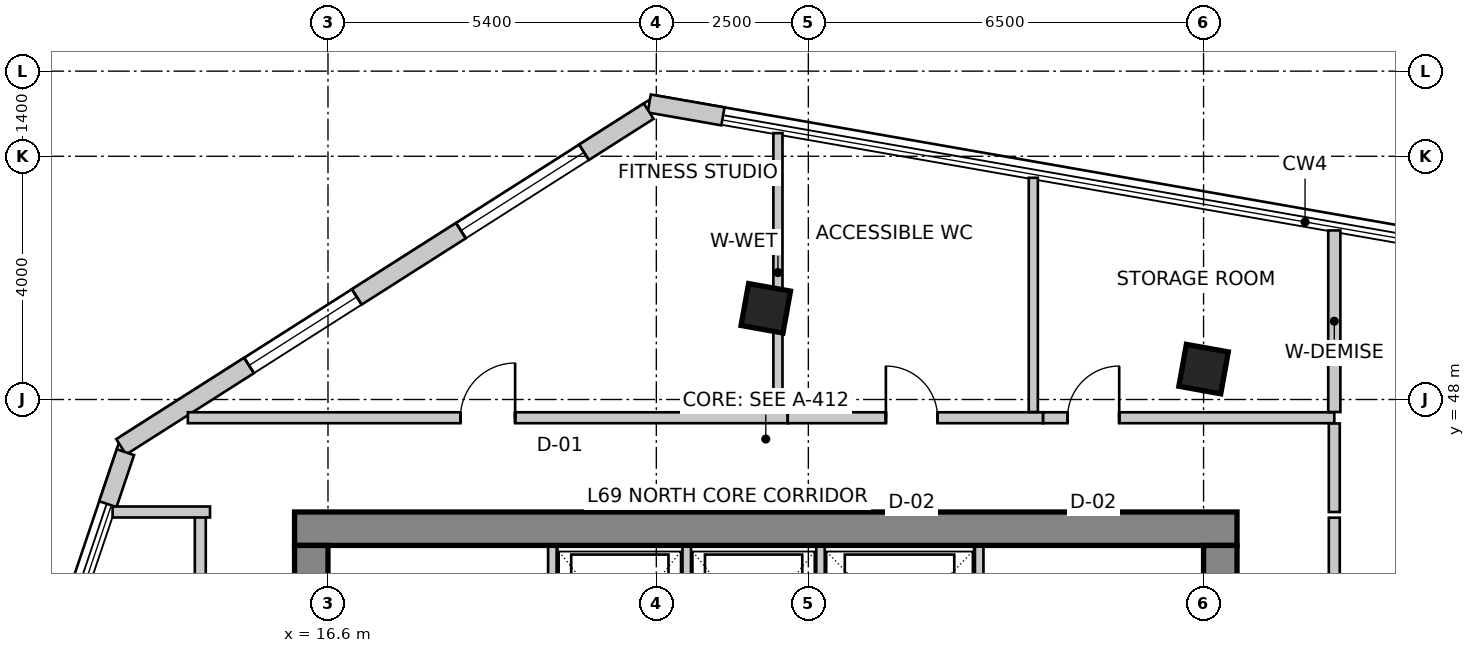
"""IFC4 building model, lengths in metres.
Left out: names, types, materials, properties, quantities, classifications, styles, units other than length and angle.
Written with IfcOpenShell. Run it as: python <this file> out.ifc"""

import sys

from ifc_helpers import new_model, si_unit, direction, frame, frame_2d, origin, origin_2d, place, context, subcontext, project, spatial, rectangle, extrude, source, transform, mapped, element, fill, save


model = new_model("IFC4")
c1 = context("Model", 3, precision=1e-05, world=origin(), true_north=direction((0.0, 1.0)))
c2 = subcontext(c1, "Body", "Model", "MODEL_VIEW")
j1 = project(units=[si_unit("LENGTHUNIT", "METRE"), si_unit("PLANEANGLEUNIT", "RADIAN")], contexts=[c1])
p1 = place(None, origin())
s1 = spatial("IfcSite", under=j1, at=p1, CompositionType="ELEMENT")
p2 = place(p1, origin())
s2 = spatial("IfcBuilding", under=s1, at=p2, CompositionType="ELEMENT")
p3 = place(p2, frame((0.0, 0.0, 270.9)))
s3 = spatial("IfcBuildingStorey", under=s2, at=p3, CompositionType="ELEMENT", Elevation=270.9)
p4 = place(p3, frame((16.05, 45.875, 0.0), z_axis=(0.0, 0.0, 1.0), x_axis=(1.0, 0.0, 0.0)))
e1 = element("IfcWall", 1, at=p4, inside=s3, PredefinedType="SHEAR", context=c2, shape_type="SweptSolid", body=[
    extrude(rectangle(XDim=15.5, YDim=0.55, at=frame_2d((7.75, 0.0))), origin(), (0.0, 0.0, 1.0), 3.6),
])
p5 = place(p3, frame((16.325, 34.2, 0.0), z_axis=(0.0, 0.0, 1.0), x_axis=(0.0, 1.0, 0.0)))
e2 = element("IfcWall", 2, at=p5, inside=s3, PredefinedType="SHEAR", context=c2, shape_type="SweptSolid", body=[
    extrude(rectangle(XDim=11.4, YDim=0.55, at=frame_2d((5.7, 0.0))), origin(), (0.0, 0.0, 1.0), 3.6),
])
m1 = source(origin(), c2, "Body", "SweptSolid", [
    extrude(rectangle(XDim=1.1, YDim=2.15, at=frame_2d((0.55, 1.075))), frame((0.0, 0.285, 0.0), z_axis=(0.0, -1.0, 0.0), x_axis=(1.0, 0.0, 0.0)), (0.0, 0.0, 1.0), 0.57),
])
p6 = place(p5, frame((7.15, 0.0, 0.0)))
e3 = element("IfcOpeningElement", 3, at=p6, cuts=e2, PredefinedType="OPENING", context=c2, shape_type="MappedRepresentation", body=[
    mapped(m1, transform((0.0, 0.0, 0.0), scale=1.0)),
])
p7 = place(p3, frame((31.275, 34.2, 0.0), z_axis=(0.0, 0.0, 1.0), x_axis=(0.0, 1.0, 0.0)))
e4 = element("IfcWall", 4, at=p7, inside=s3, PredefinedType="SHEAR", context=c2, shape_type="SweptSolid", body=[
    extrude(rectangle(XDim=11.4, YDim=0.55, at=frame_2d((5.7, 0.0))), origin(), (0.0, 0.0, 1.0), 3.6),
])
p8 = place(p7, frame((7.35, 0.0, 0.0)))
e5 = element("IfcOpeningElement", 5, at=p8, cuts=e4, PredefinedType="OPENING", context=c2, shape_type="MappedRepresentation", body=[
    mapped(m1, transform((0.0, 0.0, 0.0), scale=1.0)),
])
m2 = source(origin(), c2, "Body", "SweptSolid", [
    extrude(rectangle(XDim=0.7, YDim=0.7, at=origin_2d()), origin(), (0.0, 0.0, 1.0), 3.6),
])
for number, where, z_axis, x_axis in (
    (6, (23.8, 49.5, 0.0), (0.0, 0.0, 1.0), (0.984, -0.177, 0.0)),
    (7, (31.0, 48.5, 0.0), (0.0, 0.0, 1.0), (0.984, -0.177, 0.0)),
):
    element("IfcColumn", number, at=place(p3, frame(where, z_axis=z_axis, x_axis=x_axis)), inside=s3, PredefinedType="COLUMN", context=c2, shape_type="MappedRepresentation", body=[
        mapped(m2, transform((0.0, 0.0, 0.0), scale=1.0)),
    ])
p9 = place(p3, frame((23.095, 52.656, 0.0), z_axis=(0.0, 0.0, 1.0), x_axis=(-0.985008549623, 0.172505527937, 0.0)))
e8 = element("IfcWall", 8, at=p9, inside=s3, PredefinedType="SOLIDWALL", context=c2, shape_type="SweptSolid", body=[
    extrude(rectangle(XDim=1.23, YDim=0.3, at=frame_2d((0.615, 0.0))), origin(), (0.0, 0.0, 1.0), 3.35),
])
p10 = place(p3, frame((21.874, 52.742, 0.0), z_axis=(0.0, 0.0, 1.0), x_axis=(-0.84365659959, -0.536883173482, 0.0)))
e9 = element("IfcWall", 9, at=p10, inside=s3, PredefinedType="SOLIDWALL", context=c2, shape_type="SweptSolid", body=[
    extrude(rectangle(XDim=10.283, YDim=0.3, at=frame_2d((5.142, 0.0))), origin(), (0.0, 0.0, 1.0), 3.35),
])
m3 = source(origin(), c2, "Body", "SweptSolid", [
    extrude(rectangle(XDim=2.4, YDim=2.2, at=frame_2d((1.2, 1.1))), frame((0.0, 0.16, 0.0), z_axis=(0.0, -1.0, 0.0), x_axis=(1.0, 0.0, 0.0)), (0.0, 0.0, 1.0), 0.32),
])
p11 = place(p10, frame((1.26, 0.0, 0.85)))
e10 = element("IfcOpeningElement", 10, at=p11, cuts=e9, PredefinedType="OPENING", context=c2, shape_type="MappedRepresentation", body=[
    mapped(m3, transform((0.0, 0.0, 0.0), scale=1.0)),
])
m4 = source(origin(), c2, "Body", "SweptSolid", [
    extrude(rectangle(XDim=2.1, YDim=2.0, at=frame_2d((1.05, 1.0))), frame((0.0, 0.16, 0.0), z_axis=(0.0, -1.0, 0.0), x_axis=(1.0, 0.0, 0.0)), (0.0, 0.0, 1.0), 0.32),
])
p12 = place(p10, frame((5.69, 0.0, 0.85)))
e11 = element("IfcOpeningElement", 11, at=p12, cuts=e9, PredefinedType="OPENING", context=c2, shape_type="MappedRepresentation", body=[
    mapped(m4, transform((0.0, 0.0, 0.0), scale=1.0)),
])
p13 = place(p3, frame((13.269, 47.134, 0.0), z_axis=(0.0, 0.0, 1.0), x_axis=(-0.31995770778, -0.947431826166, 0.0)))
e12 = element("IfcWall", 12, at=p13, inside=s3, PredefinedType="SOLIDWALL", context=c2, shape_type="SweptSolid", body=[
    extrude(rectangle(XDim=0.903, YDim=0.3, at=frame_2d((0.451, 0.0))), origin(), (0.0, 0.0, 1.0), 3.35),
])
for number, where, z_axis, x_axis in (
    (13, (20.29, 43.28, 0.0), (0.0, 0.0, 1.0), (0.0, 1.0, 0.0)),
    (14, (27.31, 43.28, 0.0), (0.0, 0.0, 1.0), (0.0, 1.0, 0.0)),
):
    element("IfcWall", number, at=place(p3, frame(where, z_axis=z_axis, x_axis=x_axis)), inside=s3, PredefinedType="SOLIDWALL", context=c2, shape_type="SweptSolid", body=[
        extrude(rectangle(XDim=2.3, YDim=0.14, at=frame_2d((1.15, 0.0))), origin(), (0.0, 0.0, 1.0), 3.35),
    ])
for number, where, z_axis, x_axis in (
    (15, (22.5, 43.02, 0.0), (0.0, 0.0, 1.0), (0.0, 1.0, 0.0)),
    (16, (24.7, 43.02, 0.0), (0.0, 0.0, 1.0), (0.0, 1.0, 0.0)),
):
    element("IfcWall", number, at=place(p3, frame(where, z_axis=z_axis, x_axis=x_axis)), inside=s3, PredefinedType="SOLIDWALL", context=c2, shape_type="SweptSolid", body=[
        extrude(rectangle(XDim=2.56, YDim=0.14, at=frame_2d((1.28, 0.0))), origin(), (0.0, 0.0, 1.0), 3.35),
    ])
p14 = place(p3, frame((14.5, 33.744, 0.0), z_axis=(0.0, 0.0, 1.0), x_axis=(0.0, 1.0, 0.0)))
e17 = element("IfcWall", 17, at=p14, inside=s3, PredefinedType="PARTITIONING", context=c2, shape_type="SweptSolid", body=[
    extrude(rectangle(XDim=12.406, YDim=0.18, at=frame_2d((6.203, 0.0))), origin(), (0.0, 0.0, 1.0), 3.35),
])
m5 = source(origin(), c2, "Body", "SweptSolid", [
    extrude(rectangle(XDim=0.9, YDim=2.15, at=frame_2d((0.45, 1.075))), frame((0.0, 0.1, 0.0), z_axis=(0.0, -1.0, 0.0), x_axis=(1.0, 0.0, 0.0)), (0.0, 0.0, 1.0), 0.2),
])
p15 = place(p14, frame((4.37, 0.0, 0.0)))
e18 = element("IfcOpeningElement", 18, at=p15, cuts=e17, PredefinedType="OPENING", context=c2, shape_type="MappedRepresentation", body=[
    mapped(m5, transform((0.0, 0.0, 0.0), scale=1.0)),
])
p16 = place(p3, frame((14.66, 46.15, 0.0), z_axis=(0.0, 0.0, 1.0), x_axis=(-1.0, 0.0, 0.0)))
e19 = element("IfcWall", 19, at=p16, inside=s3, PredefinedType="PARTITIONING", context=c2, shape_type="SweptSolid", body=[
    extrude(rectangle(XDim=1.602, YDim=0.18, at=frame_2d((0.801, 0.0))), origin(), (0.0, 0.0, 1.0), 3.35),
])
p17 = place(p3, frame((14.295, 47.7, 0.0), z_axis=(0.0, 0.0, 1.0), x_axis=(1.0, 0.0, 0.0)))
e20 = element("IfcWall", 20, at=p17, inside=s3, PredefinedType="PARTITIONING", context=c2, shape_type="SweptSolid", body=[
    extrude(rectangle(XDim=9.865, YDim=0.18, at=frame_2d((4.932, 0.0))), origin(), (0.0, 0.0, 1.0), 2.935),
])
p18 = place(p17, frame((4.482, 0.0, 0.0)))
e21 = element("IfcOpeningElement", 21, at=p18, cuts=e20, PredefinedType="OPENING", context=c2, shape_type="MappedRepresentation", body=[
    mapped(m5, transform((0.0, 0.0, 0.0), scale=1.0)),
])
p19 = place(p3, frame((24.162, 47.7, 0.0), z_axis=(0.0, 0.0, 1.0), x_axis=(1.0, 0.0, 0.0)))
e22 = element("IfcWall", 22, at=p19, inside=s3, PredefinedType="PARTITIONING", context=c2, shape_type="SweptSolid", body=[
    extrude(rectangle(XDim=4.198, YDim=0.18, at=frame_2d((2.099, 0.0))), origin(), (0.0, 0.0, 1.0), 3.35),
])
m6 = source(origin(), c2, "Body", "SweptSolid", [
    extrude(rectangle(XDim=0.85, YDim=2.15, at=frame_2d((0.425, 1.075))), frame((0.0, 0.1, 0.0), z_axis=(0.0, -1.0, 0.0), x_axis=(1.0, 0.0, 0.0)), (0.0, 0.0, 1.0), 0.2),
])
p20 = place(p19, frame((1.613, 0.0, 0.0)))
e23 = element("IfcOpeningElement", 23, at=p20, cuts=e22, PredefinedType="OPENING", context=c2, shape_type="MappedRepresentation", body=[
    mapped(m6, transform((0.0, 0.0, 0.0), scale=1.0)),
])
p21 = place(p3, frame((28.362, 47.7, 0.0), z_axis=(0.0, 0.0, 1.0), x_axis=(1.0, 0.0, 0.0)))
e24 = element("IfcWall", 24, at=p21, inside=s3, PredefinedType="PARTITIONING", context=c2, shape_type="SweptSolid", body=[
    extrude(rectangle(XDim=4.788, YDim=0.18, at=frame_2d((2.394, 0.0))), origin(), (0.0, 0.0, 1.0), 2.788),
])
p22 = place(p21, frame((0.401, 0.0, 0.0)))
e25 = element("IfcOpeningElement", 25, at=p22, cuts=e24, PredefinedType="OPENING", context=c2, shape_type="MappedRepresentation", body=[
    mapped(m6, transform((0.0, 0.0, 0.0), scale=1.0)),
])
p23 = place(p3, frame((33.15, 47.606, 0.0), z_axis=(0.0, 0.0, 1.0), x_axis=(0.0, -1.0, 0.0)))
e26 = element("IfcWall", 26, at=p23, inside=s3, PredefinedType="PARTITIONING", context=c2, shape_type="SweptSolid", body=[
    extrude(rectangle(XDim=1.456, YDim=0.18, at=frame_2d((0.728, 0.0))), origin(), (0.0, 0.0, 1.0), 3.35),
])
p24 = place(p3, frame((33.15, 46.056, 0.0), z_axis=(0.0, 0.0, 1.0), x_axis=(0.0, -1.0, 0.0)))
e27 = element("IfcWall", 27, at=p24, inside=s3, PredefinedType="PARTITIONING", context=c2, shape_type="SweptSolid", body=[
    extrude(rectangle(XDim=4.636, YDim=0.18, at=frame_2d((2.318, 0.0))), origin(), (0.0, 0.0, 1.0), 2.788),
])
p25 = place(p24, frame((1.868, 0.0, 0.0)))
e28 = element("IfcOpeningElement", 28, at=p25, cuts=e27, PredefinedType="OPENING", context=c2, shape_type="MappedRepresentation", body=[
    mapped(m5, transform((0.0, 0.0, 0.0), scale=1.0)),
])
p26 = place(p3, frame((24.0, 52.381, 0.0), z_axis=(0.0, 0.0, 1.0), x_axis=(0.0, -1.0, 0.0)))
e29 = element("IfcWall", 29, at=p26, inside=s3, PredefinedType="PARTITIONING", context=c2, shape_type="SweptSolid", body=[
    extrude(rectangle(XDim=4.587, YDim=0.15, at=frame_2d((2.293, 0.0))), origin(), (0.0, 0.0, 1.0), 2.642),
])
p27 = place(p3, frame((28.2, 51.646, 0.0), z_axis=(0.0, 0.0, 1.0), x_axis=(0.0, -1.0, 0.0)))
e30 = element("IfcWall", 30, at=p27, inside=s3, PredefinedType="PARTITIONING", context=c2, shape_type="SweptSolid", body=[
    extrude(rectangle(XDim=3.852, YDim=0.15, at=frame_2d((1.926, 0.0))), origin(), (0.0, 0.0, 1.0), 2.642),
])
p28 = place(p3, frame((33.15, 50.78, 0.0), z_axis=(0.0, 0.0, 1.0), x_axis=(0.0, -1.0, 0.0)))
e31 = element("IfcWall", 31, at=p28, inside=s3, PredefinedType="PARTITIONING", context=c2, shape_type="SweptSolid", body=[
    extrude(rectangle(XDim=2.986, YDim=0.2, at=frame_2d((1.493, 0.0))), origin(), (0.0, 0.0, 1.0), 2.642),
])
m7 = source(origin(), c2, "Body", "SweptSolid", [
    extrude(rectangle(XDim=2.4, YDim=2.2, at=frame_2d((1.2, 1.1))), frame((0.0, -0.015, 0.0), z_axis=(0.0, -1.0, 0.0), x_axis=(1.0, 0.0, 0.0)), (0.0, 0.0, 1.0), 0.06),
])
p29 = place(p11, origin())
e32 = element("IfcWindow", 32, at=p29, inside=s3, PartitioningType="SINGLE_PANEL", PredefinedType="WINDOW", context=c2, shape_type="MappedRepresentation", body=[
    mapped(m7, transform((0.0, 0.0, 0.0), scale=1.0)),
])
fill(e10, e32)
m8 = source(origin(), c2, "Body", "SweptSolid", [
    extrude(rectangle(XDim=2.1, YDim=2.0, at=frame_2d((1.05, 1.0))), frame((0.0, -0.015, 0.0), z_axis=(0.0, -1.0, 0.0), x_axis=(1.0, 0.0, 0.0)), (0.0, 0.0, 1.0), 0.06),
])
p30 = place(p12, origin())
e33 = element("IfcWindow", 33, at=p30, inside=s3, PartitioningType="SINGLE_PANEL", PredefinedType="WINDOW", context=c2, shape_type="MappedRepresentation", body=[
    mapped(m8, transform((0.0, 0.0, 0.0), scale=1.0)),
])
fill(e11, e33)
m9 = source(origin(), c2, "Body", "SweptSolid", [
    extrude(rectangle(XDim=0.9, YDim=2.15, at=frame_2d((0.45, 1.075))), frame((0.0, 0.025, 0.0), z_axis=(0.0, -1.0, 0.0), x_axis=(1.0, 0.0, 0.0)), (0.0, 0.0, 1.0), 0.05),
])
p31 = place(p18, origin())
e34 = element("IfcDoor", 34, at=p31, inside=s3, OperationType="SINGLE_SWING_RIGHT", PredefinedType="DOOR", context=c2, shape_type="MappedRepresentation", body=[
    mapped(m9, transform((0.0, 0.0, 0.0), scale=1.0)),
])
fill(e21, e34)
m10 = source(origin(), c2, "Body", "SweptSolid", [
    extrude(rectangle(XDim=0.85, YDim=2.15, at=frame_2d((0.425, 1.075))), frame((0.0, 0.025, 0.0), z_axis=(0.0, -1.0, 0.0), x_axis=(1.0, 0.0, 0.0)), (0.0, 0.0, 1.0), 0.05),
])
p32 = place(p20, origin())
e35 = element("IfcDoor", 35, at=p32, inside=s3, OperationType="SINGLE_SWING_LEFT", PredefinedType="DOOR", context=c2, shape_type="MappedRepresentation", body=[
    mapped(m10, transform((0.0, 0.0, 0.0), scale=1.0)),
])
fill(e23, e35)
p33 = place(p22, origin())
e36 = element("IfcDoor", 36, at=p33, inside=s3, OperationType="SINGLE_SWING_RIGHT", PredefinedType="DOOR", context=c2, shape_type="MappedRepresentation", body=[
    mapped(m10, transform((0.0, 0.0, 0.0), scale=1.0)),
])
fill(e25, e36)
save(model, sys.argv[1])
